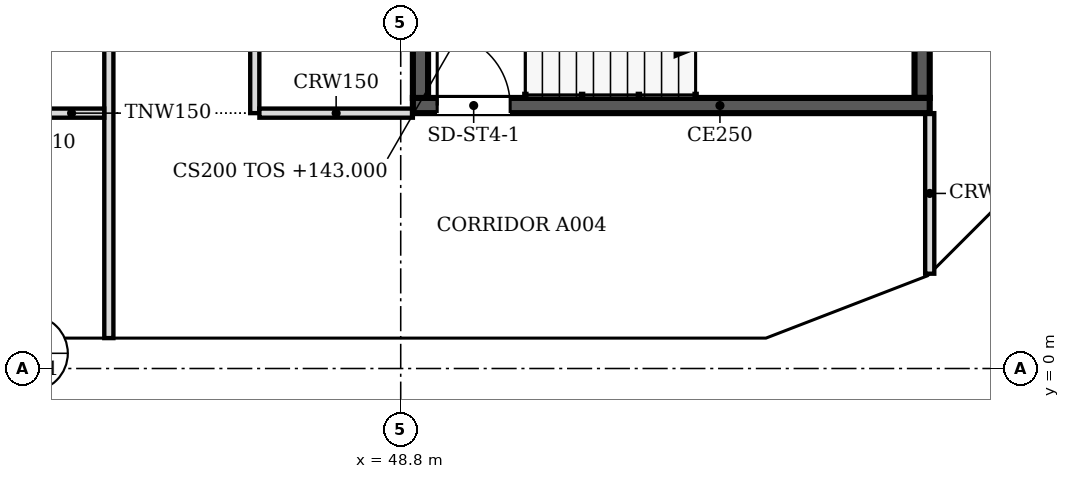
"""IFC4 building model, lengths in metres.
Left out: names, types, materials, properties, quantities, classifications, styles, units other than length and angle.
Written with IfcOpenShell. Run it as: python <this file> out.ifc"""

import sys

from ifc_helpers import new_model, si_unit, direction, frame, frame_2d, origin, place, context, subcontext, project, spatial, polyline, rectangle, outline, extrude, faceted_brep, source, transform, mapped, element, fill, save


model = new_model("IFC4")
c1 = context("Model", 3, precision=1e-05, world=origin(), true_north=direction((0.0, 1.0)))
c2 = subcontext(c1, "Body", "Model", "MODEL_VIEW")
j1 = project(units=[si_unit("LENGTHUNIT", "METRE"), si_unit("PLANEANGLEUNIT", "RADIAN")], contexts=[c1])
p1 = place(None, origin())
s1 = spatial("IfcSite", under=j1, at=p1, CompositionType="ELEMENT")
p2 = place(p1, origin())
s2 = spatial("IfcBuilding", under=s1, at=p2, CompositionType="ELEMENT")
p3 = place(p2, frame((0.0, 0.0, 143.0)))
s3 = spatial("IfcBuildingStorey", under=s2, at=p3, CompositionType="ELEMENT", Elevation=143.0)
m1 = source(origin(), c2, "Body", "SweptSolid", [
    extrude(outline(polyline([(3.05, 0.0), (6.1, 3.8), (3.05, 7.6), (0.0, 3.8), (3.05, 0.0)])), frame((0.0, 0.25, 0.0), z_axis=(0.0, -1.0, 0.0), x_axis=(1.0, 0.0, 0.0)), (0.0, 0.0, 1.0), 0.5),
])
p4 = place(p3, frame((39.65, 0.25, -3.8), z_axis=(0.0, 0.0, 1.0), x_axis=(1.0, 0.0, 0.0)))
e1 = element("IfcWall", 1, at=p4, inside=s3, PredefinedType="SOLIDWALL", context=c2, shape_type="MappedRepresentation", body=[
    mapped(m1, transform((0.0, 0.0, 0.0), scale=1.0)),
])
m2 = source(origin(), c2, "Body", "SweptSolid", [
    extrude(outline(polyline([(3.05, 0.399), (5.78, 3.8), (3.05, 7.201), (0.321, 3.8), (3.05, 0.399)])), frame((0.0, 0.26, 0.0), z_axis=(0.0, -1.0, 0.0), x_axis=(1.0, 0.0, 0.0)), (0.0, 0.0, 1.0), 0.52),
])
p5 = place(p4, origin())
e2 = element("IfcOpeningElement", 2, at=p5, cuts=e1, PredefinedType="OPENING", context=c2, shape_type="MappedRepresentation", body=[
    mapped(m2, transform((0.0, 0.0, 0.0), scale=1.0)),
])
p6 = place(p3, frame((45.75, 0.25, -3.8), z_axis=(0.0, 0.0, 1.0), x_axis=(1.0, 0.0, 0.0)))
e3 = element("IfcWall", 3, at=p6, inside=s3, PredefinedType="SOLIDWALL", context=c2, shape_type="MappedRepresentation", body=[
    mapped(m1, transform((0.0, 0.0, 0.0), scale=1.0)),
])
p7 = place(p6, origin())
e4 = element("IfcOpeningElement", 4, at=p7, cuts=e3, PredefinedType="OPENING", context=c2, shape_type="MappedRepresentation", body=[
    mapped(m2, transform((0.0, 0.0, 0.0), scale=1.0)),
])
m3 = source(origin(), c2, "Body", "Brep", [
    faceted_brep([(3.003, -0.25, 0.0), (3.05, -0.25, 0.06), (3.05, -0.25, 7.54), (3.003, -0.25, 7.6), (0.0, -0.25, 3.8), (0.0, 0.25, 3.8), (2.957, 0.25, 7.541), (2.957, 0.25, 0.059), (3.003, 0.0, 0.0), (3.003, 0.0, 7.6)], [[[0, 1, 2, 3, 4]], [[5, 6, 7]], [[1, 0, 8]], [[9, 3, 2]], [[6, 5, 4, 3, 9]], [[5, 7, 8, 0, 4]], [[1, 8, 7, 6, 9, 2]]]),
])
p8 = place(p3, frame((51.85, 0.25, -3.8), z_axis=(0.0, 0.0, 1.0), x_axis=(1.0, 0.0, 0.0)))
e5 = element("IfcWall", 5, at=p8, inside=s3, PredefinedType="SOLIDWALL", context=c2, shape_type="MappedRepresentation", body=[
    mapped(m3, transform((0.0, 0.0, 0.0), scale=1.0)),
])
m4 = source(origin(), c2, "Body", "SweptSolid", [
    extrude(outline(polyline([(2.803, 6.944), (0.319, 3.8), (2.803, 0.656), (2.803, 6.944)])), frame((0.0, 0.26, 0.0), z_axis=(0.0, -1.0, 0.0), x_axis=(1.0, 0.0, 0.0)), (0.0, 0.0, 1.0), 0.52),
])
p9 = place(p8, origin())
e6 = element("IfcOpeningElement", 6, at=p9, cuts=e5, PredefinedType="OPENING", context=c2, shape_type="MappedRepresentation", body=[
    mapped(m4, transform((0.0, 0.0, 0.0), scale=1.0)),
])
m5 = source(origin(), c2, "Body", "Brep", [
    faceted_brep([(0.047, -0.25, 0.0), (2.997, -0.25, 3.8), (0.047, -0.25, 7.6), (0.0, -0.25, 7.541), (0.0, -0.25, 0.059), (0.093, 0.25, 7.54), (2.944, 0.25, 3.868), (2.944, 0.25, 3.732), (0.093, 0.25, 0.06), (2.997, 0.0, 3.8), (0.047, 0.0, 0.0), (0.047, 0.0, 7.6)], [[[0, 1, 2, 3, 4]], [[5, 6, 7, 8]], [[8, 7, 9, 1, 0, 10]], [[6, 5, 11, 2, 1, 9]], [[3, 2, 11]], [[10, 0, 4]], [[8, 10, 4, 3, 11, 5]], [[9, 7, 6]]]),
])
p10 = place(p3, frame((54.81, 0.233, -3.8), z_axis=(0.0, 0.0, 1.0), x_axis=(0.932990326376, 0.359901446078, 0.0)))
e7 = element("IfcWall", 7, at=p10, inside=s3, PredefinedType="SOLIDWALL", context=c2, shape_type="MappedRepresentation", body=[
    mapped(m5, transform((0.0, 0.0, 0.0), scale=1.0)),
])
m6 = source(origin(), c2, "Body", "SweptSolid", [
    extrude(outline(polyline([(0.247, 0.665), (2.681, 3.8), (0.247, 6.935), (0.247, 0.665)])), frame((0.0, 0.26, 0.0), z_axis=(0.0, -1.0, 0.0), x_axis=(1.0, 0.0, 0.0)), (0.0, 0.0, 1.0), 0.52),
])
p11 = place(p10, origin())
e8 = element("IfcOpeningElement", 8, at=p11, cuts=e7, PredefinedType="OPENING", context=c2, shape_type="MappedRepresentation", body=[
    mapped(m6, transform((0.0, 0.0, 0.0), scale=1.0)),
])
m7 = source(origin(), c2, "Body", "Brep", [
    faceted_brep([(2.944, -0.25, 0.0), (2.997, -0.25, 0.068), (2.997, -0.25, 7.532), (2.944, -0.25, 7.6), (0.0, -0.25, 3.8), (0.053, 0.25, 3.868), (2.891, 0.25, 7.532), (2.891, 0.25, 0.068), (0.053, 0.25, 3.732), (2.944, 0.0, 0.0), (2.944, 0.0, 7.6), (0.0, 0.0, 3.8)], [[[0, 1, 2, 3, 4]], [[5, 6, 7, 8]], [[1, 0, 9]], [[10, 3, 2]], [[6, 5, 11, 4, 3, 10]], [[8, 7, 9, 0, 4, 11]], [[8, 11, 5]], [[1, 9, 7, 6, 10, 2]]]),
])
p12 = place(p3, frame((57.606, 1.312, -3.8), z_axis=(0.0, 0.0, 1.0), x_axis=(0.707147509625, 0.707066050402, 0.0)))
e9 = element("IfcWall", 9, at=p12, inside=s3, PredefinedType="SOLIDWALL", context=c2, shape_type="MappedRepresentation", body=[
    mapped(m7, transform((0.0, 0.0, 0.0), scale=1.0)),
])
m8 = source(origin(), c2, "Body", "SweptSolid", [
    extrude(outline(polyline([(2.744, 6.934), (0.316, 3.8), (2.744, 0.666), (2.744, 6.934)])), frame((0.0, 0.26, 0.0), z_axis=(0.0, -1.0, 0.0), x_axis=(1.0, 0.0, 0.0)), (0.0, 0.0, 1.0), 0.52),
])
p13 = place(p12, origin())
e10 = element("IfcOpeningElement", 10, at=p13, cuts=e9, PredefinedType="OPENING", context=c2, shape_type="MappedRepresentation", body=[
    mapped(m8, transform((0.0, 0.0, 0.0), scale=1.0)),
])
p14 = place(p2, frame((0.0, 0.0, 146.8)))
s4 = spatial("IfcBuildingStorey", under=s2, at=p14, CompositionType="ELEMENT", Elevation=146.8)
p15 = place(p14, frame((42.7, 0.25, -3.8), z_axis=(0.0, 0.0, 1.0), x_axis=(1.0, 0.0, 0.0)))
e11 = element("IfcWall", 11, at=p15, inside=s4, PredefinedType="SOLIDWALL", context=c2, shape_type="MappedRepresentation", body=[
    mapped(m1, transform((0.0, 0.0, 0.0), scale=1.0)),
])
p16 = place(p15, origin())
e12 = element("IfcOpeningElement", 12, at=p16, cuts=e11, PredefinedType="OPENING", context=c2, shape_type="MappedRepresentation", body=[
    mapped(m2, transform((0.0, 0.0, 0.0), scale=1.0)),
])
m9 = source(origin(), c2, "Body", "Brep", [
    faceted_brep([(3.05, -0.25, 0.0), (6.053, -0.25, 3.8), (3.05, -0.25, 7.6), (0.0, -0.25, 3.8), (0.0, 0.25, 3.8), (3.05, 0.25, 7.6), (6.007, 0.25, 3.859), (6.007, 0.25, 3.741), (3.05, 0.25, 0.0), (6.053, 0.0, 3.8)], [[[0, 1, 2, 3]], [[4, 5, 6, 7, 8]], [[8, 7, 9, 1, 0]], [[6, 5, 2, 1, 9]], [[5, 4, 3, 2]], [[4, 8, 0, 3]], [[9, 7, 6]]]),
])
p17 = place(p14, frame((48.8, 0.25, -3.8), z_axis=(0.0, 0.0, 1.0), x_axis=(1.0, 0.0, 0.0)))
e13 = element("IfcWall", 13, at=p17, inside=s4, PredefinedType="SOLIDWALL", context=c2, shape_type="MappedRepresentation", body=[
    mapped(m9, transform((0.0, 0.0, 0.0), scale=1.0)),
])
m10 = source(origin(), c2, "Body", "SweptSolid", [
    extrude(outline(polyline([(3.049, 0.401), (5.735, 3.8), (3.049, 7.199), (0.321, 3.8), (3.049, 0.401)])), frame((0.0, 0.26, 0.0), z_axis=(0.0, -1.0, 0.0), x_axis=(1.0, 0.0, 0.0)), (0.0, 0.0, 1.0), 0.52),
])
p18 = place(p17, origin())
e14 = element("IfcOpeningElement", 14, at=p18, cuts=e13, PredefinedType="OPENING", context=c2, shape_type="MappedRepresentation", body=[
    mapped(m10, transform((0.0, 0.0, 0.0), scale=1.0)),
])
m11 = source(origin(), c2, "Body", "Brep", [
    faceted_brep([(2.95, -0.25, 0.0), (3.003, -0.25, 0.068), (3.003, -0.25, 7.532), (2.95, -0.25, 7.6), (0.0, -0.25, 3.8), (0.047, 0.25, 3.86), (2.898, 0.25, 7.532), (2.898, 0.25, 0.068), (0.047, 0.25, 3.74), (2.95, 0.0, 0.0), (2.95, 0.0, 7.6), (0.0, 0.0, 3.8)], [[[0, 1, 2, 3, 4]], [[5, 6, 7, 8]], [[1, 0, 9]], [[10, 3, 2]], [[6, 5, 11, 4, 3, 10]], [[8, 7, 9, 0, 4, 11]], [[8, 11, 5]], [[1, 9, 7, 6, 10, 2]]]),
])
p19 = place(p14, frame((54.854, 0.25, -3.8), z_axis=(0.0, 0.0, 1.0), x_axis=(0.932970071518, 0.359953949349, 0.0)))
e15 = element("IfcWall", 15, at=p19, inside=s4, PredefinedType="SOLIDWALL", context=c2, shape_type="MappedRepresentation", body=[
    mapped(m11, transform((0.0, 0.0, 0.0), scale=1.0)),
])
m12 = source(origin(), c2, "Body", "SweptSolid", [
    extrude(outline(polyline([(2.75, 6.935), (0.316, 3.8), (2.75, 0.665), (2.75, 6.935)])), frame((0.0, 0.26, 0.0), z_axis=(0.0, -1.0, 0.0), x_axis=(1.0, 0.0, 0.0)), (0.0, 0.0, 1.0), 0.52),
])
p20 = place(p19, origin())
e16 = element("IfcOpeningElement", 16, at=p20, cuts=e15, PredefinedType="OPENING", context=c2, shape_type="MappedRepresentation", body=[
    mapped(m12, transform((0.0, 0.0, 0.0), scale=1.0)),
])
m13 = source(origin(), c2, "Body", "Brep", [
    faceted_brep([(0.053, -0.25, 0.0), (2.997, -0.25, 3.8), (0.053, -0.25, 7.6), (0.0, -0.25, 7.532), (0.0, -0.25, 0.068), (0.106, 0.25, 7.532), (2.944, 0.25, 3.868), (2.944, 0.25, 3.732), (0.106, 0.25, 0.068), (2.997, 0.0, 3.8), (0.053, 0.0, 0.0), (0.053, 0.0, 7.6)], [[[0, 1, 2, 3, 4]], [[5, 6, 7, 8]], [[8, 7, 9, 1, 0, 10]], [[6, 5, 11, 2, 1, 9]], [[3, 2, 11]], [[10, 0, 4]], [[8, 10, 4, 3, 11, 5]], [[9, 7, 6]]]),
])
p21 = place(p14, frame((57.569, 1.274, -3.8), z_axis=(0.0, 0.0, 1.0), x_axis=(0.707066050402, 0.707147509625, 0.0)))
e17 = element("IfcWall", 17, at=p21, inside=s4, PredefinedType="SOLIDWALL", context=c2, shape_type="MappedRepresentation", body=[
    mapped(m13, transform((0.0, 0.0, 0.0), scale=1.0)),
])
m14 = source(origin(), c2, "Body", "SweptSolid", [
    extrude(outline(polyline([(0.253, 0.666), (2.681, 3.8), (0.253, 6.934), (0.253, 0.666)])), frame((0.0, 0.26, 0.0), z_axis=(0.0, -1.0, 0.0), x_axis=(1.0, 0.0, 0.0)), (0.0, 0.0, 1.0), 0.52),
])
p22 = place(p21, origin())
e18 = element("IfcOpeningElement", 18, at=p22, cuts=e17, PredefinedType="OPENING", context=c2, shape_type="MappedRepresentation", body=[
    mapped(m14, transform((0.0, 0.0, 0.0), scale=1.0)),
])
p23 = place(p3, frame((57.5, 4.325, 0.0), z_axis=(0.0, 0.0, 1.0), x_axis=(-1.0, 0.0, 0.0)))
e19 = element("IfcWall", 19, at=p23, inside=s3, PredefinedType="SOLIDWALL", context=c2, shape_type="SweptSolid", body=[
    extrude(rectangle(XDim=8.5, YDim=0.25, at=frame_2d((4.25, 0.0))), origin(), (0.0, 0.0, 1.0), 3.8),
])
m15 = source(origin(), c2, "Body", "SweptSolid", [
    extrude(rectangle(XDim=1.2, YDim=2.1, at=frame_2d((0.6, 1.05))), frame((0.0, 0.135, 0.0), z_axis=(0.0, -1.0, 0.0), x_axis=(1.0, 0.0, 0.0)), (0.0, 0.0, 1.0), 0.27),
])
p24 = place(p23, frame((6.9, 0.0, 0.0)))
e20 = element("IfcOpeningElement", 20, at=p24, cuts=e19, PredefinedType="OPENING", context=c2, shape_type="MappedRepresentation", body=[
    mapped(m15, transform((0.0, 0.0, 0.0), scale=1.0)),
])
for number, where, z_axis, x_axis in (
    (21, (49.125, 4.45, 0.0), (0.0, 0.0, 1.0), (0.0, 1.0, 0.0)),
    (22, (57.375, 7.85, 0.0), (0.0, 0.0, 1.0), (0.0, -1.0, 0.0)),
):
    element("IfcWall", number, at=place(p3, frame(where, z_axis=z_axis, x_axis=x_axis)), inside=s3, PredefinedType="SOLIDWALL", context=c2, shape_type="SweptSolid", body=[
        extrude(rectangle(XDim=3.4, YDim=0.25, at=frame_2d((1.7, 0.0))), origin(), (0.0, 0.0, 1.0), 3.8),
    ])
p25 = place(p3, frame((44.0, 0.5, 0.0), z_axis=(0.0, 0.0, 1.0), x_axis=(0.0, 1.0, 0.0)))
e23 = element("IfcWall", 23, at=p25, inside=s3, PredefinedType="PARTITIONING", context=c2, shape_type="SweptSolid", body=[
    extrude(rectangle(XDim=21.424, YDim=0.15, at=frame_2d((10.712, 0.0))), origin(), (0.0, 0.0, 1.0), 3.067),
])
m16 = source(origin(), c2, "Body", "SweptSolid", [
    extrude(rectangle(XDim=1.0, YDim=2.1, at=frame_2d((0.5, 1.05))), frame((0.0, 0.085, 0.0), z_axis=(0.0, -1.0, 0.0), x_axis=(1.0, 0.0, 0.0)), (0.0, 0.0, 1.0), 0.17),
])
p26 = place(p25, frame((6.2, 0.0, 0.0)))
e24 = element("IfcOpeningElement", 24, at=p26, cuts=e23, PredefinedType="OPENING", context=c2, shape_type="MappedRepresentation", body=[
    mapped(m16, transform((0.0, 0.0, 0.0), scale=1.0)),
])
p27 = place(p25, frame((13.5, 0.0, 0.0)))
e25 = element("IfcOpeningElement", 25, at=p27, cuts=e23, PredefinedType="OPENING", context=c2, shape_type="MappedRepresentation", body=[
    mapped(m16, transform((0.0, 0.0, 0.0), scale=1.0)),
])
p28 = place(p3, frame((57.5, 1.559, 0.0), z_axis=(0.0, 0.0, 1.0), x_axis=(0.0, 1.0, 0.0)))
e26 = element("IfcWall", 26, at=p28, inside=s3, PredefinedType="PARTITIONING", context=c2, shape_type="SweptSolid", body=[
    extrude(rectangle(XDim=2.641, YDim=0.15, at=frame_2d((1.32, 0.0))), origin(), (0.0, 0.0, 1.0), 3.067),
])
p29 = place(p3, frame((43.924, 4.2, 0.0), z_axis=(0.0, 0.0, 1.0), x_axis=(-1.0, 0.0, 0.0)))
e27 = element("IfcWall", 27, at=p29, inside=s3, PredefinedType="PARTITIONING", context=c2, shape_type="SweptSolid", body=[
    extrude(rectangle(XDim=2.973, YDim=0.15, at=frame_2d((1.487, 0.0))), origin(), (0.0, 0.0, 1.0), 3.067),
])
m17 = source(origin(), c2, "Body", "SweptSolid", [
    extrude(rectangle(XDim=0.9, YDim=2.1, at=frame_2d((0.45, 1.05))), frame((0.0, 0.085, 0.0), z_axis=(0.0, -1.0, 0.0), x_axis=(1.0, 0.0, 0.0)), (0.0, 0.0, 1.0), 0.17),
])
p30 = place(p29, frame((1.073, 0.0, 0.0)))
e28 = element("IfcOpeningElement", 28, at=p30, cuts=e27, PredefinedType="OPENING", context=c2, shape_type="MappedRepresentation", body=[
    mapped(m17, transform((0.0, 0.0, 0.0), scale=1.0)),
])
p31 = place(p3, frame((46.4, 21.924, 0.0), z_axis=(0.0, 0.0, 1.0), x_axis=(0.0, -1.0, 0.0)))
e29 = element("IfcWall", 29, at=p31, inside=s3, PredefinedType="PARTITIONING", context=c2, shape_type="SweptSolid", body=[
    extrude(rectangle(XDim=17.724, YDim=0.15, at=frame_2d((8.862, 0.0))), origin(), (0.0, 0.0, 1.0), 3.067),
])
p32 = place(p31, frame((3.423, 0.0, 0.0)))
e30 = element("IfcOpeningElement", 30, at=p32, cuts=e29, PredefinedType="OPENING", context=c2, shape_type="MappedRepresentation", body=[
    mapped(m17, transform((0.0, 0.0, 0.0), scale=1.0)),
])
p33 = place(p31, frame((12.324, 0.0, 0.0)))
e31 = element("IfcOpeningElement", 31, at=p33, cuts=e29, PredefinedType="OPENING", context=c2, shape_type="MappedRepresentation", body=[
    mapped(m16, transform((0.0, 0.0, 0.0), scale=1.0)),
])
p34 = place(p3, frame((46.476, 4.2, 0.0), z_axis=(0.0, 0.0, 1.0), x_axis=(1.0, 0.0, 0.0)))
e32 = element("IfcWall", 32, at=p34, inside=s3, PredefinedType="PARTITIONING", context=c2, shape_type="SweptSolid", body=[
    extrude(rectangle(XDim=2.524, YDim=0.15, at=frame_2d((1.262, 0.0))), origin(), (0.0, 0.0, 1.0), 3.067),
])
m18 = source(origin(), c2, "Body", "SweptSolid", [
    extrude(rectangle(XDim=1.2, YDim=2.1, at=frame_2d((0.6, 1.05))), frame((0.0, 0.025, 0.0), z_axis=(0.0, -1.0, 0.0), x_axis=(1.0, 0.0, 0.0)), (0.0, 0.0, 1.0), 0.05),
])
p35 = place(p24, origin())
e33 = element("IfcDoor", 33, at=p35, inside=s3, OperationType="SINGLE_SWING_RIGHT", PredefinedType="DOOR", context=c2, shape_type="MappedRepresentation", body=[
    mapped(m18, transform((0.0, 0.0, 0.0), scale=1.0)),
])
fill(e20, e33)
save(model, sys.argv[1])
